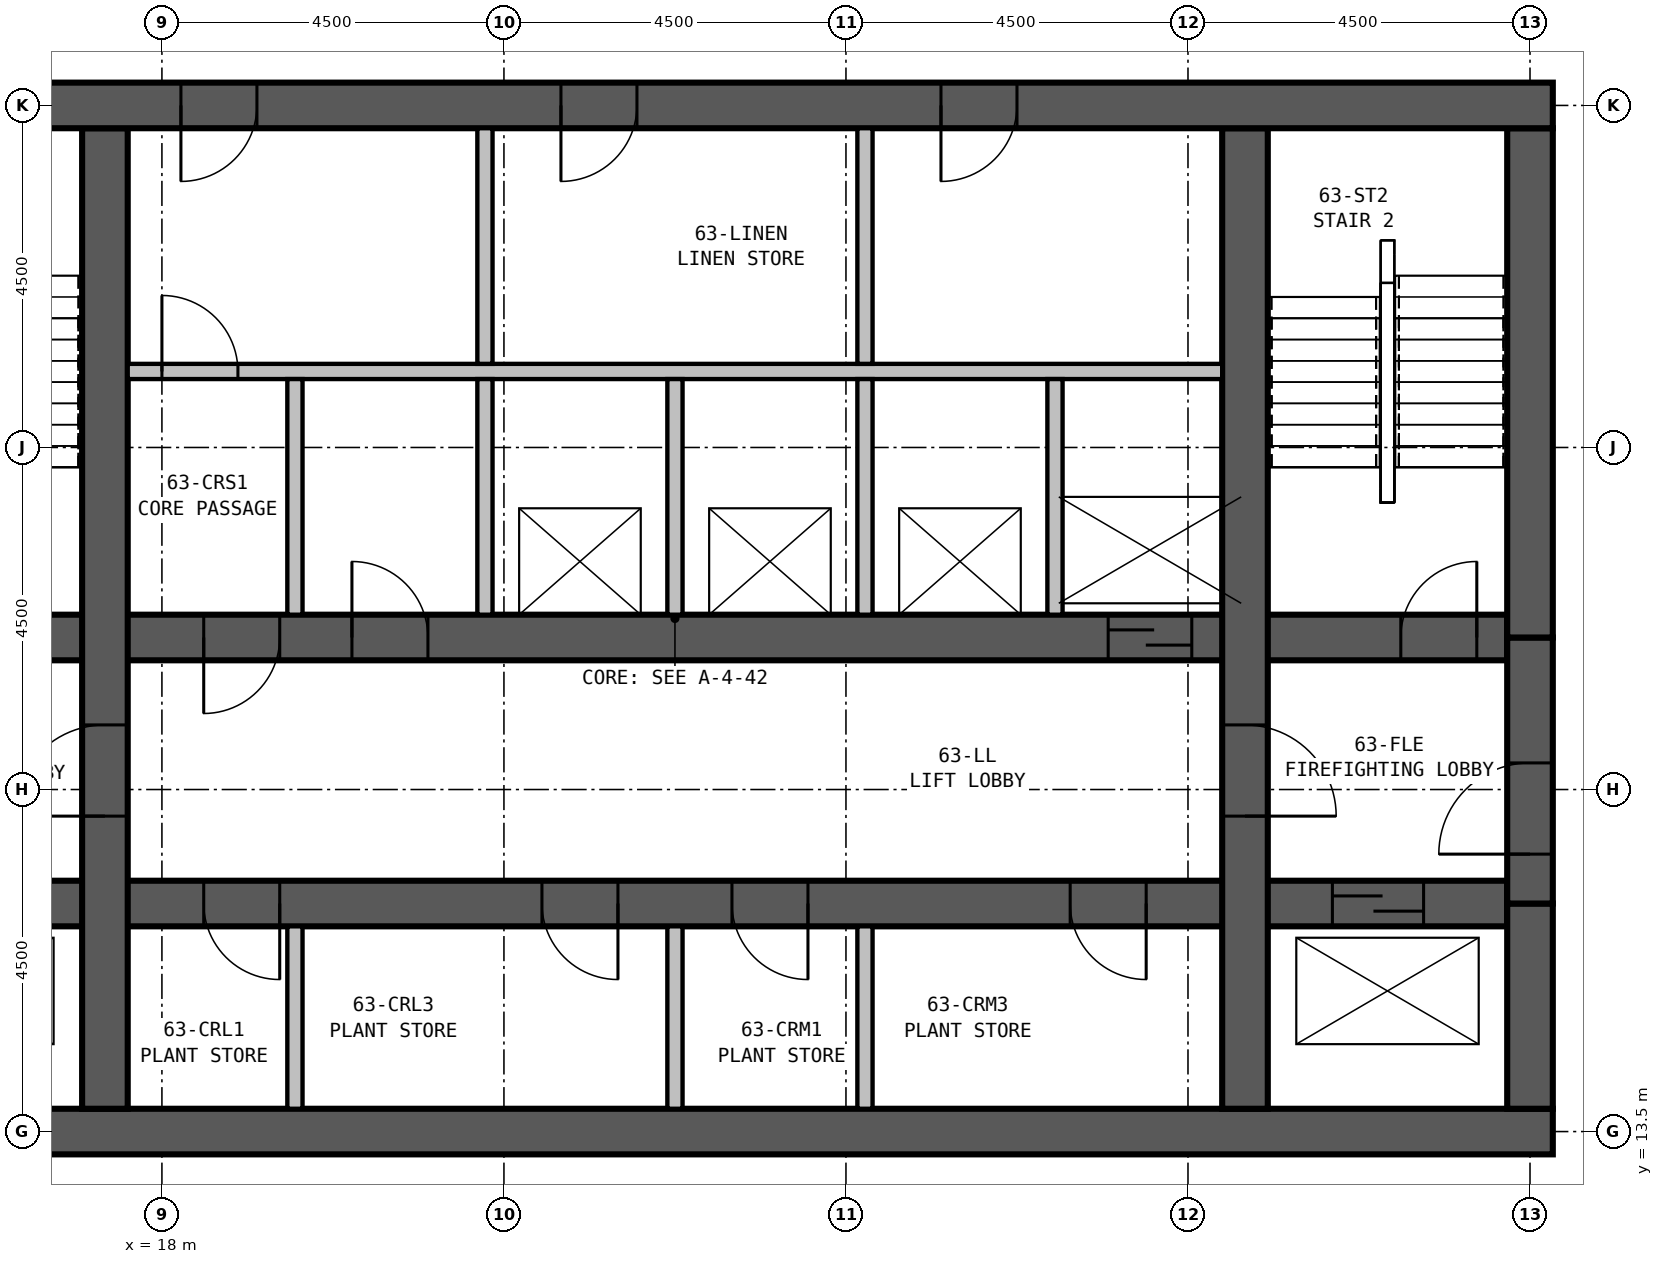
"""IFC4 building model, lengths in metres.
Left out: names, types, materials, properties, quantities, classifications, styles, units other than length and angle.
Written with IfcOpenShell. Run it as: python <this file> out.ifc"""

import sys

from ifc_helpers import new_model, si_unit, direction, frame, frame_2d, origin, place, context, subcontext, project, spatial, rectangle, extrude, element, fill, save


model = new_model("IFC4")
c1 = context("Model", 3, precision=1e-05, world=origin(), true_north=direction((0.0, 1.0)))
c2 = subcontext(c1, "Body", "Model", "MODEL_VIEW")
j1 = project(units=[si_unit("LENGTHUNIT", "METRE"), si_unit("PLANEANGLEUNIT", "RADIAN")], contexts=[c1])
p1 = place(None, origin())
s1 = spatial("IfcSite", under=j1, at=p1, CompositionType="ELEMENT")
p2 = place(p1, origin())
s2 = spatial("IfcBuilding", under=s1, at=p2, CompositionType="ELEMENT")
p3 = place(p2, frame((0.0, 0.0, 244.7)))
s3 = spatial("IfcBuildingStorey", under=s2, at=p3, CompositionType="ELEMENT", Elevation=244.7)
p4 = place(p3, frame((13.2, 13.5, 0.0), z_axis=(0.0, 0.0, 1.0), x_axis=(1.0, 0.0, 0.0)))
e1 = element("IfcWall", 1, at=p4, inside=s3, PredefinedType="SHEAR", context=c2, shape_type="SweptSolid", body=[
    extrude(rectangle(XDim=23.1, YDim=0.6, at=frame_2d((11.55, 0.0))), origin(), (0.0, 0.0, 1.0), 6.0),
])
p5 = place(p3, frame((36.3, 27.0, 0.0), z_axis=(0.0, 0.0, 1.0), x_axis=(-1.0, 0.0, 0.0)))
e2 = element("IfcWall", 2, at=p5, inside=s3, PredefinedType="SHEAR", context=c2, shape_type="SweptSolid", body=[
    extrude(rectangle(XDim=23.6, YDim=0.6, at=frame_2d((11.8, 0.0))), origin(), (0.0, 0.0, 1.0), 6.0),
])
p6 = place(p5, frame((17.05, 0.0, 0.0)))
e3 = element("IfcOpeningElement", 3, at=p6, cuts=e2, PredefinedType="OPENING", context=c2, shape_type="SweptSolid", body=[
    extrude(rectangle(XDim=1.0, YDim=2.1, at=frame_2d((0.5, 1.05))), frame((0.0, 0.31, 0.0), z_axis=(0.0, -1.0, 0.0), x_axis=(1.0, 0.0, 0.0)), (0.0, 0.0, 1.0), 0.62),
])
p7 = place(p5, frame((12.05, 0.0, 0.0)))
e4 = element("IfcOpeningElement", 4, at=p7, cuts=e2, PredefinedType="OPENING", context=c2, shape_type="SweptSolid", body=[
    extrude(rectangle(XDim=1.0, YDim=2.1, at=frame_2d((0.5, 1.05))), frame((0.0, 0.31, 0.0), z_axis=(0.0, -1.0, 0.0), x_axis=(1.0, 0.0, 0.0)), (0.0, 0.0, 1.0), 0.62),
])
p8 = place(p5, frame((7.05, 0.0, 0.0)))
e5 = element("IfcOpeningElement", 5, at=p8, cuts=e2, PredefinedType="OPENING", context=c2, shape_type="SweptSolid", body=[
    extrude(rectangle(XDim=1.0, YDim=2.1, at=frame_2d((0.5, 1.05))), frame((0.0, 0.31, 0.0), z_axis=(0.0, -1.0, 0.0), x_axis=(1.0, 0.0, 0.0)), (0.0, 0.0, 1.0), 0.62),
])
p9 = place(p3, frame((17.25, 13.8, 0.0), z_axis=(0.0, 0.0, 1.0), x_axis=(0.0, 1.0, 0.0)))
e6 = element("IfcWall", 6, at=p9, inside=s3, PredefinedType="SHEAR", context=c2, shape_type="SweptSolid", body=[
    extrude(rectangle(XDim=12.9, YDim=0.6, at=frame_2d((6.45, 0.0))), origin(), (0.0, 0.0, 1.0), 6.0),
])
p10 = place(p9, frame((3.85, 0.0, 0.0)))
e7 = element("IfcOpeningElement", 7, at=p10, cuts=e6, PredefinedType="OPENING", context=c2, shape_type="SweptSolid", body=[
    extrude(rectangle(XDim=1.2, YDim=2.1, at=frame_2d((0.6, 1.05))), frame((0.0, 0.31, 0.0), z_axis=(0.0, -1.0, 0.0), x_axis=(1.0, 0.0, 0.0)), (0.0, 0.0, 1.0), 0.62),
])
p11 = place(p3, frame((32.25, 13.8, 0.0), z_axis=(0.0, 0.0, 1.0), x_axis=(0.0, 1.0, 0.0)))
e8 = element("IfcWall", 8, at=p11, inside=s3, PredefinedType="SHEAR", context=c2, shape_type="SweptSolid", body=[
    extrude(rectangle(XDim=12.9, YDim=0.6, at=frame_2d((6.45, 0.0))), origin(), (0.0, 0.0, 1.0), 6.0),
])
p12 = place(p11, frame((5.05, 0.0, 0.0), z_axis=(0.0, 0.0, 1.0), x_axis=(-1.0, 0.0, 0.0)))
e9 = element("IfcOpeningElement", 9, at=p12, cuts=e8, PredefinedType="OPENING", context=c2, shape_type="SweptSolid", body=[
    extrude(rectangle(XDim=1.2, YDim=2.1, at=frame_2d((0.6, 1.05))), frame((0.0, 0.31, 0.0), z_axis=(0.0, -1.0, 0.0), x_axis=(1.0, 0.0, 0.0)), (0.0, 0.0, 1.0), 0.62),
])
p13 = place(p3, frame((13.8, 16.5, 0.0), z_axis=(0.0, 0.0, 1.0), x_axis=(1.0, 0.0, 0.0)))
e10 = element("IfcWall", 10, at=p13, inside=s3, PredefinedType="SHEAR", context=c2, shape_type="SweptSolid", body=[
    extrude(rectangle(XDim=21.9, YDim=0.6, at=frame_2d((10.95, 0.0))), origin(), (0.0, 0.0, 1.0), 6.0),
])
p14 = place(p13, frame((5.75, 0.0, 0.0), z_axis=(0.0, 0.0, 1.0), x_axis=(-1.0, 0.0, 0.0)))
e11 = element("IfcOpeningElement", 11, at=p14, cuts=e10, PredefinedType="OPENING", context=c2, shape_type="SweptSolid", body=[
    extrude(rectangle(XDim=1.0, YDim=2.1, at=frame_2d((0.5, 1.05))), frame((0.0, 0.31, 0.0), z_axis=(0.0, -1.0, 0.0), x_axis=(1.0, 0.0, 0.0)), (0.0, 0.0, 1.0), 0.62),
])
p15 = place(p13, frame((10.2, 0.0, 0.0), z_axis=(0.0, 0.0, 1.0), x_axis=(-1.0, 0.0, 0.0)))
e12 = element("IfcOpeningElement", 12, at=p15, cuts=e10, PredefinedType="OPENING", context=c2, shape_type="SweptSolid", body=[
    extrude(rectangle(XDim=1.0, YDim=2.1, at=frame_2d((0.5, 1.05))), frame((0.0, 0.31, 0.0), z_axis=(0.0, -1.0, 0.0), x_axis=(1.0, 0.0, 0.0)), (0.0, 0.0, 1.0), 0.62),
])
p16 = place(p13, frame((12.7, 0.0, 0.0), z_axis=(0.0, 0.0, 1.0), x_axis=(-1.0, 0.0, 0.0)))
e13 = element("IfcOpeningElement", 13, at=p16, cuts=e10, PredefinedType="OPENING", context=c2, shape_type="SweptSolid", body=[
    extrude(rectangle(XDim=1.0, YDim=2.1, at=frame_2d((0.5, 1.05))), frame((0.0, 0.31, 0.0), z_axis=(0.0, -1.0, 0.0), x_axis=(1.0, 0.0, 0.0)), (0.0, 0.0, 1.0), 0.62),
])
p17 = place(p13, frame((17.15, 0.0, 0.0), z_axis=(0.0, 0.0, 1.0), x_axis=(-1.0, 0.0, 0.0)))
e14 = element("IfcOpeningElement", 14, at=p17, cuts=e10, PredefinedType="OPENING", context=c2, shape_type="SweptSolid", body=[
    extrude(rectangle(XDim=1.0, YDim=2.1, at=frame_2d((0.5, 1.05))), frame((0.0, 0.31, 0.0), z_axis=(0.0, -1.0, 0.0), x_axis=(1.0, 0.0, 0.0)), (0.0, 0.0, 1.0), 0.62),
])
p18 = place(p13, frame((0.6, 0.0, 0.0)))
e15 = element("IfcOpeningElement", 15, at=p18, cuts=e10, PredefinedType="OPENING", context=c2, shape_type="SweptSolid", body=[
    extrude(rectangle(XDim=1.2, YDim=2.1, at=frame_2d((0.6, 1.05))), frame((0.0, 0.31, 0.0), z_axis=(0.0, -1.0, 0.0), x_axis=(1.0, 0.0, 0.0)), (0.0, 0.0, 1.0), 0.62),
])
p19 = place(p13, frame((19.6, 0.0, 0.0)))
e16 = element("IfcOpeningElement", 16, at=p19, cuts=e10, PredefinedType="OPENING", context=c2, shape_type="SweptSolid", body=[
    extrude(rectangle(XDim=1.2, YDim=2.1, at=frame_2d((0.6, 1.05))), frame((0.0, 0.31, 0.0), z_axis=(0.0, -1.0, 0.0), x_axis=(1.0, 0.0, 0.0)), (0.0, 0.0, 1.0), 0.62),
])
p20 = place(p3, frame((13.8, 20.0, 0.0), z_axis=(0.0, 0.0, 1.0), x_axis=(1.0, 0.0, 0.0)))
e17 = element("IfcWall", 17, at=p20, inside=s3, PredefinedType="SHEAR", context=c2, shape_type="SweptSolid", body=[
    extrude(rectangle(XDim=21.9, YDim=0.6, at=frame_2d((10.95, 0.0))), origin(), (0.0, 0.0, 1.0), 6.0),
])
p21 = place(p20, frame((0.5, 0.0, 0.0)))
e18 = element("IfcOpeningElement", 18, at=p21, cuts=e17, PredefinedType="OPENING", context=c2, shape_type="SweptSolid", body=[
    extrude(rectangle(XDim=1.0, YDim=2.1, at=frame_2d((0.5, 1.05))), frame((0.0, 0.31, 0.0), z_axis=(0.0, -1.0, 0.0), x_axis=(1.0, 0.0, 0.0)), (0.0, 0.0, 1.0), 0.62),
])
p22 = place(p20, frame((20.5, 0.0, 0.0)))
e19 = element("IfcOpeningElement", 19, at=p22, cuts=e17, PredefinedType="OPENING", context=c2, shape_type="SweptSolid", body=[
    extrude(rectangle(XDim=1.0, YDim=2.1, at=frame_2d((0.5, 1.05))), frame((0.0, 0.31, 0.0), z_axis=(0.0, -1.0, 0.0), x_axis=(1.0, 0.0, 0.0)), (0.0, 0.0, 1.0), 0.62),
])
p23 = place(p20, frame((16.65, 0.0, 0.0)))
e20 = element("IfcOpeningElement", 20, at=p23, cuts=e17, PredefinedType="OPENING", context=c2, shape_type="SweptSolid", body=[
    extrude(rectangle(XDim=1.1, YDim=2.1, at=frame_2d((0.55, 1.05))), frame((0.0, 0.31, 0.0), z_axis=(0.0, -1.0, 0.0), x_axis=(1.0, 0.0, 0.0)), (0.0, 0.0, 1.0), 0.62),
])
p24 = place(p20, frame((5.75, 0.0, 0.0), z_axis=(0.0, 0.0, 1.0), x_axis=(-1.0, 0.0, 0.0)))
e21 = element("IfcOpeningElement", 21, at=p24, cuts=e17, PredefinedType="OPENING", context=c2, shape_type="SweptSolid", body=[
    extrude(rectangle(XDim=1.0, YDim=2.1, at=frame_2d((0.5, 1.05))), frame((0.0, 0.31, 0.0), z_axis=(0.0, -1.0, 0.0), x_axis=(1.0, 0.0, 0.0)), (0.0, 0.0, 1.0), 0.62),
])
p25 = place(p20, frame((6.7, 0.0, 0.0)))
e22 = element("IfcOpeningElement", 22, at=p25, cuts=e17, PredefinedType="OPENING", context=c2, shape_type="SweptSolid", body=[
    extrude(rectangle(XDim=1.0, YDim=2.1, at=frame_2d((0.5, 1.05))), frame((0.0, 0.31, 0.0), z_axis=(0.0, -1.0, 0.0), x_axis=(1.0, 0.0, 0.0)), (0.0, 0.0, 1.0), 0.62),
])
p26 = place(p3, frame((36.0, 13.8, 0.0), z_axis=(0.0, 0.0, 1.0), x_axis=(0.0, 1.0, 0.0)))
e23 = element("IfcWall", 23, at=p26, inside=s3, PredefinedType="SHEAR", context=c2, shape_type="SweptSolid", body=[
    extrude(rectangle(XDim=2.7, YDim=0.6, at=frame_2d((1.35, 0.0))), origin(), (0.0, 0.0, 1.0), 6.0),
])
p27 = place(p3, frame((36.0, 16.5, 0.0), z_axis=(0.0, 0.0, 1.0), x_axis=(0.0, 1.0, 0.0)))
e24 = element("IfcWall", 24, at=p27, inside=s3, PredefinedType="SHEAR", context=c2, shape_type="SweptSolid", body=[
    extrude(rectangle(XDim=3.5, YDim=0.6, at=frame_2d((1.75, 0.0))), origin(), (0.0, 0.0, 1.0), 6.0),
])
p28 = place(p27, frame((0.65, 0.0, 0.0)))
e25 = element("IfcOpeningElement", 25, at=p28, cuts=e24, PredefinedType="OPENING", context=c2, shape_type="SweptSolid", body=[
    extrude(rectangle(XDim=1.2, YDim=2.1, at=frame_2d((0.6, 1.05))), frame((0.0, 0.31, 0.0), z_axis=(0.0, -1.0, 0.0), x_axis=(1.0, 0.0, 0.0)), (0.0, 0.0, 1.0), 0.62),
])
p29 = place(p3, frame((36.0, 20.0, 0.0), z_axis=(0.0, 0.0, 1.0), x_axis=(0.0, 1.0, 0.0)))
e26 = element("IfcWall", 26, at=p29, inside=s3, PredefinedType="SHEAR", context=c2, shape_type="SweptSolid", body=[
    extrude(rectangle(XDim=6.7, YDim=0.6, at=frame_2d((3.35, 0.0))), origin(), (0.0, 0.0, 1.0), 6.0),
])
p30 = place(p3, frame((19.75, 13.8, 0.0), z_axis=(0.0, 0.0, 1.0), x_axis=(0.0, 1.0, 0.0)))
e27 = element("IfcWall", 27, at=p30, inside=s3, PredefinedType="PARTITIONING", context=c2, shape_type="SweptSolid", body=[
    extrude(rectangle(XDim=2.4, YDim=0.2, at=frame_2d((1.2, 0.0))), origin(), (0.0, 0.0, 1.0), 5.75),
])
for number, where, z_axis, x_axis in (
    (28, (19.75, 20.3, 0.0), (0.0, 0.0, 1.0), (0.0, 1.0, 0.0)),
    (29, (22.25, 20.3, 0.0), (0.0, 0.0, 1.0), (0.0, 1.0, 0.0)),
):
    element("IfcWall", number, at=place(p3, frame(where, z_axis=z_axis, x_axis=x_axis)), inside=s3, PredefinedType="PARTITIONING", context=c2, shape_type="SweptSolid", body=[
        extrude(rectangle(XDim=3.1, YDim=0.2, at=frame_2d((1.55, 0.0))), origin(), (0.0, 0.0, 1.0), 5.75),
    ])
p31 = place(p3, frame((24.75, 13.8, 0.0), z_axis=(0.0, 0.0, 1.0), x_axis=(0.0, 1.0, 0.0)))
e30 = element("IfcWall", 30, at=p31, inside=s3, PredefinedType="PARTITIONING", context=c2, shape_type="SweptSolid", body=[
    extrude(rectangle(XDim=2.4, YDim=0.2, at=frame_2d((1.2, 0.0))), origin(), (0.0, 0.0, 1.0), 5.75),
])
p32 = place(p3, frame((24.75, 20.3, 0.0), z_axis=(0.0, 0.0, 1.0), x_axis=(0.0, 1.0, 0.0)))
e31 = element("IfcWall", 31, at=p32, inside=s3, PredefinedType="PARTITIONING", context=c2, shape_type="SweptSolid", body=[
    extrude(rectangle(XDim=3.1, YDim=0.2, at=frame_2d((1.55, 0.0))), origin(), (0.0, 0.0, 1.0), 5.75),
])
p33 = place(p3, frame((27.25, 13.8, 0.0), z_axis=(0.0, 0.0, 1.0), x_axis=(0.0, 1.0, 0.0)))
e32 = element("IfcWall", 32, at=p33, inside=s3, PredefinedType="PARTITIONING", context=c2, shape_type="SweptSolid", body=[
    extrude(rectangle(XDim=2.4, YDim=0.2, at=frame_2d((1.2, 0.0))), origin(), (0.0, 0.0, 1.0), 5.75),
])
for number, where, z_axis, x_axis in (
    (33, (27.25, 20.3, 0.0), (0.0, 0.0, 1.0), (0.0, 1.0, 0.0)),
    (34, (29.75, 20.3, 0.0), (0.0, 0.0, 1.0), (0.0, 1.0, 0.0)),
):
    element("IfcWall", number, at=place(p3, frame(where, z_axis=z_axis, x_axis=x_axis)), inside=s3, PredefinedType="PARTITIONING", context=c2, shape_type="SweptSolid", body=[
        extrude(rectangle(XDim=3.1, YDim=0.2, at=frame_2d((1.55, 0.0))), origin(), (0.0, 0.0, 1.0), 5.75),
    ])
p34 = place(p3, frame((17.55, 23.5, 0.0), z_axis=(0.0, 0.0, 1.0), x_axis=(1.0, 0.0, 0.0)))
e35 = element("IfcWall", 35, at=p34, inside=s3, PredefinedType="PARTITIONING", context=c2, shape_type="SweptSolid", body=[
    extrude(rectangle(XDim=14.4, YDim=0.2, at=frame_2d((7.2, 0.0))), origin(), (0.0, 0.0, 1.0), 5.75),
])
p35 = place(p34, frame((0.45, 0.0, 0.0)))
e36 = element("IfcOpeningElement", 36, at=p35, cuts=e35, PredefinedType="OPENING", context=c2, shape_type="SweptSolid", body=[
    extrude(rectangle(XDim=1.0, YDim=2.1, at=frame_2d((0.5, 1.05))), frame((0.0, 0.11, 0.0), z_axis=(0.0, -1.0, 0.0), x_axis=(1.0, 0.0, 0.0)), (0.0, 0.0, 1.0), 0.22),
])
for number, where, z_axis, x_axis in (
    (37, (22.25, 23.6, 0.0), (0.0, 0.0, 1.0), (0.0, 1.0, 0.0)),
    (38, (27.25, 23.6, 0.0), (0.0, 0.0, 1.0), (0.0, 1.0, 0.0)),
):
    element("IfcWall", number, at=place(p3, frame(where, z_axis=z_axis, x_axis=x_axis)), inside=s3, PredefinedType="PARTITIONING", context=c2, shape_type="SweptSolid", body=[
        extrude(rectangle(XDim=3.1, YDim=0.2, at=frame_2d((1.55, 0.0))), origin(), (0.0, 0.0, 1.0), 5.75),
    ])
p36 = place(p35, origin())
e39 = element("IfcDoor", 39, at=p36, inside=s3, OperationType="SINGLE_SWING_LEFT", PredefinedType="DOOR", context=c2, shape_type="SweptSolid", body=[
    extrude(rectangle(XDim=1.0, YDim=2.1, at=frame_2d((0.5, 1.05))), frame((0.0, 0.025, 0.0), z_axis=(0.0, -1.0, 0.0), x_axis=(1.0, 0.0, 0.0)), (0.0, 0.0, 1.0), 0.05),
])
fill(e36, e39)
p37 = place(p28, origin())
e40 = element("IfcDoor", 40, at=p37, inside=s3, OperationType="SINGLE_SWING_LEFT", PredefinedType="DOOR", context=c2, shape_type="SweptSolid", body=[
    extrude(rectangle(XDim=1.2, YDim=2.1, at=frame_2d((0.6, 1.05))), frame((0.0, 0.3, 0.0), z_axis=(0.0, -1.0, 0.0), x_axis=(1.0, 0.0, 0.0)), (0.0, 0.0, 1.0), 0.6),
])
fill(e25, e40)
p38 = place(p10, origin())
e41 = element("IfcDoor", 41, at=p38, inside=s3, OperationType="SINGLE_SWING_LEFT", PredefinedType="DOOR", context=c2, shape_type="SweptSolid", body=[
    extrude(rectangle(XDim=1.2, YDim=2.1, at=frame_2d((0.6, 1.05))), frame((0.0, 0.3, 0.0), z_axis=(0.0, -1.0, 0.0), x_axis=(1.0, 0.0, 0.0)), (0.0, 0.0, 1.0), 0.6),
])
fill(e7, e41)
p39 = place(p12, origin())
e42 = element("IfcDoor", 42, at=p39, inside=s3, OperationType="SINGLE_SWING_RIGHT", PredefinedType="DOOR", context=c2, shape_type="SweptSolid", body=[
    extrude(rectangle(XDim=1.2, YDim=2.1, at=frame_2d((0.6, 1.05))), frame((0.0, 0.3, 0.0), z_axis=(0.0, -1.0, 0.0), x_axis=(1.0, 0.0, 0.0)), (0.0, 0.0, 1.0), 0.6),
])
fill(e9, e42)
p40 = place(p22, origin())
e43 = element("IfcDoor", 43, at=p40, inside=s3, OperationType="SINGLE_SWING_RIGHT", PredefinedType="DOOR", context=c2, shape_type="SweptSolid", body=[
    extrude(rectangle(XDim=1.0, YDim=2.1, at=frame_2d((0.5, 1.05))), frame((0.0, 0.3, 0.0), z_axis=(0.0, -1.0, 0.0), x_axis=(1.0, 0.0, 0.0)), (0.0, 0.0, 1.0), 0.6),
])
fill(e19, e43)
p41 = place(p23, origin())
e44 = element("IfcDoor", 44, at=p41, inside=s3, OperationType="SLIDING_TO_LEFT", PredefinedType="DOOR", context=c2, shape_type="SweptSolid", body=[
    extrude(rectangle(XDim=1.1, YDim=2.1, at=frame_2d((0.55, 1.05))), frame((0.0, 0.3, 0.0), z_axis=(0.0, -1.0, 0.0), x_axis=(1.0, 0.0, 0.0)), (0.0, 0.0, 1.0), 0.6),
])
fill(e20, e44)
p42 = place(p14, origin())
e45 = element("IfcDoor", 45, at=p42, inside=s3, OperationType="SINGLE_SWING_LEFT", PredefinedType="DOOR", context=c2, shape_type="SweptSolid", body=[
    extrude(rectangle(XDim=1.0, YDim=2.1, at=frame_2d((0.5, 1.05))), frame((0.0, 0.3, 0.0), z_axis=(0.0, -1.0, 0.0), x_axis=(1.0, 0.0, 0.0)), (0.0, 0.0, 1.0), 0.6),
])
fill(e11, e45)
p43 = place(p15, origin())
e46 = element("IfcDoor", 46, at=p43, inside=s3, OperationType="SINGLE_SWING_LEFT", PredefinedType="DOOR", context=c2, shape_type="SweptSolid", body=[
    extrude(rectangle(XDim=1.0, YDim=2.1, at=frame_2d((0.5, 1.05))), frame((0.0, 0.3, 0.0), z_axis=(0.0, -1.0, 0.0), x_axis=(1.0, 0.0, 0.0)), (0.0, 0.0, 1.0), 0.6),
])
fill(e12, e46)
p44 = place(p16, origin())
e47 = element("IfcDoor", 47, at=p44, inside=s3, OperationType="SINGLE_SWING_LEFT", PredefinedType="DOOR", context=c2, shape_type="SweptSolid", body=[
    extrude(rectangle(XDim=1.0, YDim=2.1, at=frame_2d((0.5, 1.05))), frame((0.0, 0.3, 0.0), z_axis=(0.0, -1.0, 0.0), x_axis=(1.0, 0.0, 0.0)), (0.0, 0.0, 1.0), 0.6),
])
fill(e13, e47)
p45 = place(p17, origin())
e48 = element("IfcDoor", 48, at=p45, inside=s3, OperationType="SINGLE_SWING_LEFT", PredefinedType="DOOR", context=c2, shape_type="SweptSolid", body=[
    extrude(rectangle(XDim=1.0, YDim=2.1, at=frame_2d((0.5, 1.05))), frame((0.0, 0.3, 0.0), z_axis=(0.0, -1.0, 0.0), x_axis=(1.0, 0.0, 0.0)), (0.0, 0.0, 1.0), 0.6),
])
fill(e14, e48)
p46 = place(p24, origin())
e49 = element("IfcDoor", 49, at=p46, inside=s3, OperationType="SINGLE_SWING_RIGHT", PredefinedType="DOOR", context=c2, shape_type="SweptSolid", body=[
    extrude(rectangle(XDim=1.0, YDim=2.1, at=frame_2d((0.5, 1.05))), frame((0.0, 0.3, 0.0), z_axis=(0.0, -1.0, 0.0), x_axis=(1.0, 0.0, 0.0)), (0.0, 0.0, 1.0), 0.6),
])
fill(e21, e49)
p47 = place(p25, origin())
e50 = element("IfcDoor", 50, at=p47, inside=s3, OperationType="SINGLE_SWING_LEFT", PredefinedType="DOOR", context=c2, shape_type="SweptSolid", body=[
    extrude(rectangle(XDim=1.0, YDim=2.1, at=frame_2d((0.5, 1.05))), frame((0.0, 0.3, 0.0), z_axis=(0.0, -1.0, 0.0), x_axis=(1.0, 0.0, 0.0)), (0.0, 0.0, 1.0), 0.6),
])
fill(e22, e50)
p48 = place(p19, origin())
e51 = element("IfcDoor", 51, at=p48, inside=s3, OperationType="SLIDING_TO_LEFT", PredefinedType="DOOR", context=c2, shape_type="SweptSolid", body=[
    extrude(rectangle(XDim=1.2, YDim=2.1, at=frame_2d((0.6, 1.05))), frame((0.0, 0.3, 0.0), z_axis=(0.0, -1.0, 0.0), x_axis=(1.0, 0.0, 0.0)), (0.0, 0.0, 1.0), 0.6),
])
fill(e16, e51)
p49 = place(p6, origin())
e52 = element("IfcDoor", 52, at=p49, inside=s3, OperationType="SINGLE_SWING_RIGHT", PredefinedType="DOOR", context=c2, shape_type="SweptSolid", body=[
    extrude(rectangle(XDim=1.0, YDim=2.1, at=frame_2d((0.5, 1.05))), frame((0.0, 0.3, 0.0), z_axis=(0.0, -1.0, 0.0), x_axis=(1.0, 0.0, 0.0)), (0.0, 0.0, 1.0), 0.6),
])
fill(e3, e52)
p50 = place(p7, origin())
e53 = element("IfcDoor", 53, at=p50, inside=s3, OperationType="SINGLE_SWING_RIGHT", PredefinedType="DOOR", context=c2, shape_type="SweptSolid", body=[
    extrude(rectangle(XDim=1.0, YDim=2.1, at=frame_2d((0.5, 1.05))), frame((0.0, 0.3, 0.0), z_axis=(0.0, -1.0, 0.0), x_axis=(1.0, 0.0, 0.0)), (0.0, 0.0, 1.0), 0.6),
])
fill(e4, e53)
p51 = place(p8, origin())
e54 = element("IfcDoor", 54, at=p51, inside=s3, OperationType="SINGLE_SWING_RIGHT", PredefinedType="DOOR", context=c2, shape_type="SweptSolid", body=[
    extrude(rectangle(XDim=1.0, YDim=2.1, at=frame_2d((0.5, 1.05))), frame((0.0, 0.3, 0.0), z_axis=(0.0, -1.0, 0.0), x_axis=(1.0, 0.0, 0.0)), (0.0, 0.0, 1.0), 0.6),
])
fill(e5, e54)
save(model, sys.argv[1])
